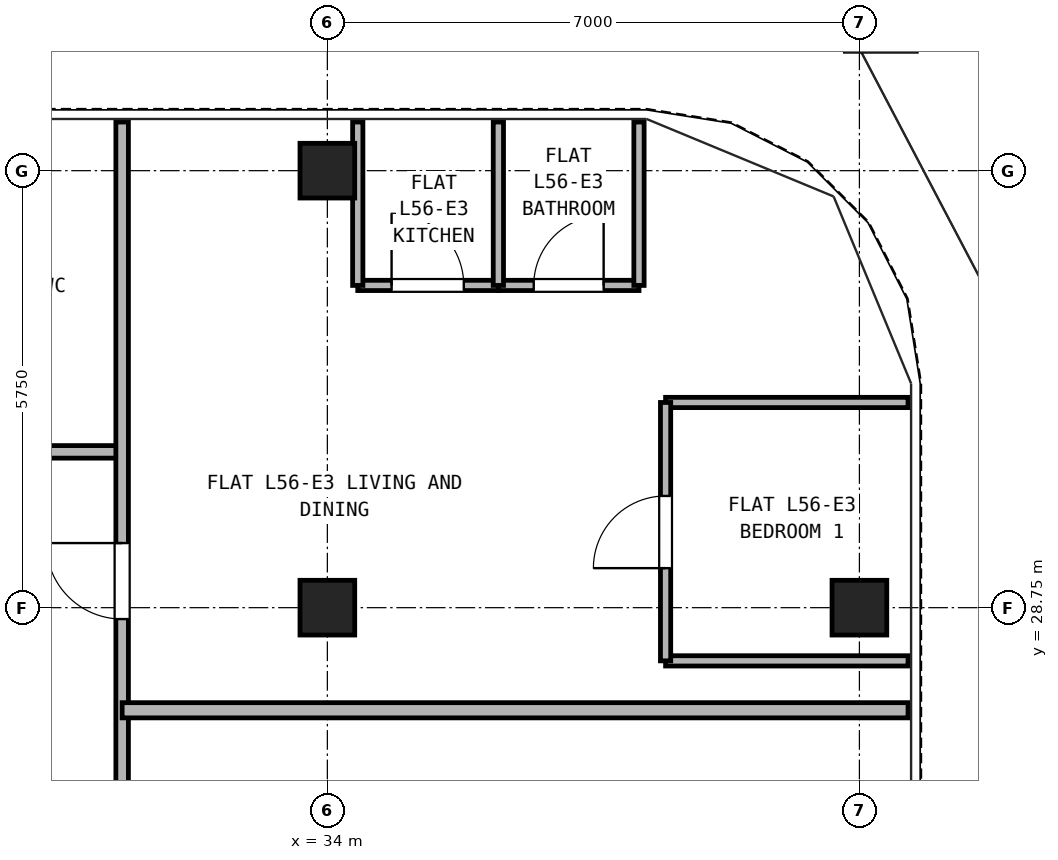
"""IFC4 building model, lengths in metres.
Left out: names, types, materials, properties, quantities, classifications, styles, units other than length and angle.
Written with IfcOpenShell. Run it as: python <this file> out.ifc"""

import sys

from ifc_helpers import new_model, si_unit, direction, frame, frame_2d, origin, origin_2d, place, context, subcontext, project, spatial, rectangle, hollow_rectangle, extrude, source, transform, mapped, element, fill, save


model = new_model("IFC4")
c1 = context("Model", 3, precision=1e-05, world=origin(), true_north=direction((0.0, 1.0)))
c2 = subcontext(c1, "Body", "Model", "MODEL_VIEW")
j1 = project(units=[si_unit("LENGTHUNIT", "METRE"), si_unit("PLANEANGLEUNIT", "RADIAN")], contexts=[c1])
p1 = place(None, origin())
s1 = spatial("IfcSite", under=j1, at=p1, CompositionType="ELEMENT")
p2 = place(p1, origin())
s2 = spatial("IfcBuilding", under=s1, at=p2, CompositionType="ELEMENT")
p3 = place(p2, frame((0.0, 0.0, 199.6)))
s3 = spatial("IfcBuildingStorey", under=s2, at=p3, CompositionType="ELEMENT", Elevation=199.6)
m1 = source(origin(), c2, "Body", "SweptSolid", [
    extrude(hollow_rectangle(XDim=0.72, YDim=0.72, WallThickness=0.04, at=origin_2d()), origin(), (0.0, 0.0, 1.0), 2.95),
])
for number, where, z_axis, x_axis in (
    (1, (34.0, 34.5, 0.0), (0.0, 0.0, 1.0), (1.0, 0.0, 0.0)),
    (2, (41.0, 28.75, 0.0), (0.0, 0.0, 1.0), (1.0, 0.0, 0.0)),
    (3, (34.0, 28.75, 0.0), (0.0, 0.0, 1.0), (1.0, 0.0, 0.0)),
):
    element("IfcColumn", number, at=place(p3, frame(where, z_axis=z_axis, x_axis=x_axis)), inside=s3, PredefinedType="COLUMN", context=c2, shape_type="MappedRepresentation", body=[
        mapped(m1, transform((0.0, 0.0, 0.0), x_axis=(1.0, 0.0, 0.0), y_axis=(0.0, 1.0, 0.0), z_axis=(0.0, 0.0, 1.0), scale=1.0)),
    ])
p4 = place(p3, frame((15.7, 30.8, 0.0), z_axis=(0.0, 0.0, 1.0), x_axis=(1.0, 0.0, 0.0)))
e4 = element("IfcWall", 4, at=p4, inside=s3, PredefinedType="PARTITIONING", context=c2, shape_type="SweptSolid", body=[
    extrude(rectangle(XDim=15.6, YDim=0.165, at=frame_2d((7.8, 0.0))), origin(), (0.0, 0.0, 1.0), 2.95),
])
p5 = place(p4, frame((2.65, 0.0, 0.0)))
e5 = element("IfcOpeningElement", 5, at=p5, cuts=e4, PredefinedType="OPENING", context=c2, shape_type="SweptSolid", body=[
    extrude(rectangle(XDim=0.95, YDim=2.15, at=frame_2d((0.475, 1.075))), frame((0.0, 0.093, 0.0), z_axis=(0.0, -1.0, 0.0), x_axis=(1.0, 0.0, 0.0)), (0.0, 0.0, 1.0), 0.185),
])
p6 = place(p4, frame((7.85, 0.0, 0.0)))
e6 = element("IfcOpeningElement", 6, at=p6, cuts=e4, PredefinedType="OPENING", context=c2, shape_type="SweptSolid", body=[
    extrude(rectangle(XDim=0.95, YDim=2.15, at=frame_2d((0.475, 1.075))), frame((0.0, 0.093, 0.0), z_axis=(0.0, -1.0, 0.0), x_axis=(1.0, 0.0, 0.0)), (0.0, 0.0, 1.0), 0.185),
])
p7 = place(p4, frame((12.5, 0.0, 0.0)))
e7 = element("IfcOpeningElement", 7, at=p7, cuts=e4, PredefinedType="OPENING", context=c2, shape_type="SweptSolid", body=[
    extrude(rectangle(XDim=0.92, YDim=2.1, at=frame_2d((0.46, 1.05))), frame((0.0, 0.093, 0.0), z_axis=(0.0, -1.0, 0.0), x_axis=(1.0, 0.0, 0.0)), (0.0, 0.0, 1.0), 0.185),
])
p8 = place(p3, frame((31.3, 10.85, 0.0), z_axis=(0.0, 0.0, 1.0), x_axis=(0.0, 1.0, 0.0)))
e8 = element("IfcWall", 8, at=p8, inside=s3, PredefinedType="PARTITIONING", context=c2, shape_type="SweptSolid", body=[
    extrude(rectangle(XDim=24.29, YDim=0.165, at=frame_2d((12.145, 0.0))), origin(), (0.0, 0.0, 1.0), 2.95),
])
p9 = place(p8, frame((3.675, 0.0, 0.0)))
e9 = element("IfcOpeningElement", 9, at=p9, cuts=e8, PredefinedType="OPENING", context=c2, shape_type="SweptSolid", body=[
    extrude(rectangle(XDim=1.0, YDim=2.15, at=frame_2d((0.5, 1.075))), frame((0.0, 0.093, 0.0), z_axis=(0.0, -1.0, 0.0), x_axis=(1.0, 0.0, 0.0)), (0.0, 0.0, 1.0), 0.185),
])
p10 = place(p8, frame((11.95, 0.0, 0.0)))
e10 = element("IfcOpeningElement", 10, at=p10, cuts=e8, PredefinedType="OPENING", context=c2, shape_type="SweptSolid", body=[
    extrude(rectangle(XDim=1.0, YDim=2.15, at=frame_2d((0.5, 1.075))), frame((0.0, 0.093, 0.0), z_axis=(0.0, -1.0, 0.0), x_axis=(1.0, 0.0, 0.0)), (0.0, 0.0, 1.0), 0.185),
])
p11 = place(p8, frame((17.75, 0.0, 0.0)))
e11 = element("IfcOpeningElement", 11, at=p11, cuts=e8, PredefinedType="OPENING", context=c2, shape_type="SweptSolid", body=[
    extrude(rectangle(XDim=1.0, YDim=2.15, at=frame_2d((0.5, 1.075))), frame((0.0, 0.093, 0.0), z_axis=(0.0, -1.0, 0.0), x_axis=(1.0, 0.0, 0.0)), (0.0, 0.0, 1.0), 0.185),
])
p12 = place(p3, frame((31.3, 27.4, 0.0), z_axis=(0.0, 0.0, 1.0), x_axis=(1.0, 0.0, 0.0)))
e12 = element("IfcWall", 12, at=p12, inside=s3, PredefinedType="PARTITIONING", context=c2, shape_type="SweptSolid", body=[
    extrude(rectangle(XDim=10.34, YDim=0.2, at=frame_2d((5.17, 0.0))), origin(), (0.0, 0.0, 1.0), 2.95),
])
p13 = place(p3, frame((34.4, 32.99, 0.0), z_axis=(0.0, 0.0, 1.0), x_axis=(1.0, 0.0, 0.0)))
e13 = element("IfcWall", 13, at=p13, inside=s3, PredefinedType="PARTITIONING", context=c2, shape_type="SweptSolid", body=[
    extrude(rectangle(XDim=1.85, YDim=0.135, at=frame_2d((0.925, 0.0))), origin(), (0.0, 0.0, 1.0), 2.95),
])
p14 = place(p13, frame((0.445, 0.0, 0.0)))
e14 = element("IfcOpeningElement", 14, at=p14, cuts=e13, PredefinedType="OPENING", context=c2, shape_type="SweptSolid", body=[
    extrude(rectangle(XDim=0.95, YDim=2.15, at=frame_2d((0.475, 1.075))), frame((0.0, 0.077, 0.0), z_axis=(0.0, -1.0, 0.0), x_axis=(1.0, 0.0, 0.0)), (0.0, 0.0, 1.0), 0.155),
])
p15 = place(p3, frame((36.25, 32.99, 0.0), z_axis=(0.0, 0.0, 1.0), x_axis=(1.0, 0.0, 0.0)))
e15 = element("IfcWall", 15, at=p15, inside=s3, PredefinedType="PARTITIONING", context=c2, shape_type="SweptSolid", body=[
    extrude(rectangle(XDim=1.85, YDim=0.135, at=frame_2d((0.925, 0.0))), origin(), (0.0, 0.0, 1.0), 2.95),
])
p16 = place(p15, frame((0.465, 0.0, 0.0)))
e16 = element("IfcOpeningElement", 16, at=p16, cuts=e15, PredefinedType="OPENING", context=c2, shape_type="SweptSolid", body=[
    extrude(rectangle(XDim=0.92, YDim=2.1, at=frame_2d((0.46, 1.05))), frame((0.0, 0.077, 0.0), z_axis=(0.0, -1.0, 0.0), x_axis=(1.0, 0.0, 0.0)), (0.0, 0.0, 1.0), 0.155),
])
for number, where, z_axis, x_axis in (
    (17, (34.4, 32.99, 0.0), (0.0, 0.0, 1.0), (0.0, 1.0, 0.0)),
    (18, (36.25, 32.99, 0.0), (0.0, 0.0, 1.0), (0.0, 1.0, 0.0)),
    (19, (38.1, 32.99, 0.0), (0.0, 0.0, 1.0), (0.0, 1.0, 0.0)),
):
    element("IfcWall", number, at=place(p3, frame(where, z_axis=z_axis, x_axis=x_axis)), inside=s3, PredefinedType="PARTITIONING", context=c2, shape_type="SweptSolid", body=[
        extrude(rectangle(XDim=2.15, YDim=0.135, at=frame_2d((1.075, 0.0))), origin(), (0.0, 0.0, 1.0), 2.95),
    ])
for number, where, z_axis, x_axis in (
    (20, (38.45, 28.05, 0.0), (0.0, 0.0, 1.0), (1.0, 0.0, 0.0)),
    (21, (38.45, 31.45, 0.0), (0.0, 0.0, 1.0), (1.0, 0.0, 0.0)),
):
    element("IfcWall", number, at=place(p3, frame(where, z_axis=z_axis, x_axis=x_axis)), inside=s3, PredefinedType="PARTITIONING", context=c2, shape_type="SweptSolid", body=[
        extrude(rectangle(XDim=3.19, YDim=0.135, at=frame_2d((1.595, 0.0))), origin(), (0.0, 0.0, 1.0), 2.95),
    ])
p17 = place(p3, frame((38.45, 28.05, 0.0), z_axis=(0.0, 0.0, 1.0), x_axis=(0.0, 1.0, 0.0)))
e22 = element("IfcWall", 22, at=p17, inside=s3, PredefinedType="PARTITIONING", context=c2, shape_type="SweptSolid", body=[
    extrude(rectangle(XDim=3.4, YDim=0.135, at=frame_2d((1.7, 0.0))), origin(), (0.0, 0.0, 1.0), 2.95),
])
p18 = place(p17, frame((1.22, 0.0, 0.0)))
e23 = element("IfcOpeningElement", 23, at=p18, cuts=e22, PredefinedType="OPENING", context=c2, shape_type="SweptSolid", body=[
    extrude(rectangle(XDim=0.95, YDim=2.15, at=frame_2d((0.475, 1.075))), frame((0.0, 0.077, 0.0), z_axis=(0.0, -1.0, 0.0), x_axis=(1.0, 0.0, 0.0)), (0.0, 0.0, 1.0), 0.155),
])
p19 = place(p14, frame((0.95, 0.0, 0.0), z_axis=(0.0, 0.0, 1.0), x_axis=(-1.0, 0.0, 0.0)))
e24 = element("IfcDoor", 24, at=p19, inside=s3, OperationType="SINGLE_SWING_LEFT", PredefinedType="DOOR", context=c2, shape_type="SweptSolid", body=[
    extrude(rectangle(XDim=0.95, YDim=2.15, at=frame_2d((0.475, 1.075))), frame((0.0, 0.025, 0.0), z_axis=(0.0, -1.0, 0.0), x_axis=(1.0, 0.0, 0.0)), (0.0, 0.0, 1.0), 0.05),
])
fill(e14, e24)
p20 = place(p16, frame((0.92, 0.0, 0.0), z_axis=(0.0, 0.0, 1.0), x_axis=(-1.0, 0.0, 0.0)))
e25 = element("IfcDoor", 25, at=p20, inside=s3, OperationType="SINGLE_SWING_RIGHT", PredefinedType="DOOR", context=c2, shape_type="SweptSolid", body=[
    extrude(rectangle(XDim=0.92, YDim=2.1, at=frame_2d((0.46, 1.05))), frame((0.0, 0.025, 0.0), z_axis=(0.0, -1.0, 0.0), x_axis=(1.0, 0.0, 0.0)), (0.0, 0.0, 1.0), 0.05),
])
fill(e16, e25)
p21 = place(p18, frame((0.95, 0.0, 0.0), z_axis=(0.0, 0.0, 1.0), x_axis=(-1.0, 0.0, 0.0)))
e26 = element("IfcDoor", 26, at=p21, inside=s3, OperationType="SINGLE_SWING_LEFT", PredefinedType="DOOR", context=c2, shape_type="SweptSolid", body=[
    extrude(rectangle(XDim=0.95, YDim=2.15, at=frame_2d((0.475, 1.075))), frame((0.0, 0.025, 0.0), z_axis=(0.0, -1.0, 0.0), x_axis=(1.0, 0.0, 0.0)), (0.0, 0.0, 1.0), 0.05),
])
fill(e23, e26)
p22 = place(p11, frame((1.0, 0.0, 0.0), z_axis=(0.0, 0.0, 1.0), x_axis=(-1.0, 0.0, 0.0)))
e27 = element("IfcDoor", 27, at=p22, inside=s3, OperationType="SINGLE_SWING_RIGHT", PredefinedType="DOOR", context=c2, shape_type="SweptSolid", body=[
    extrude(rectangle(XDim=1.0, YDim=2.15, at=frame_2d((0.5, 1.075))), frame((0.0, 0.025, 0.0), z_axis=(0.0, -1.0, 0.0), x_axis=(1.0, 0.0, 0.0)), (0.0, 0.0, 1.0), 0.05),
])
fill(e11, e27)
save(model, sys.argv[1])
